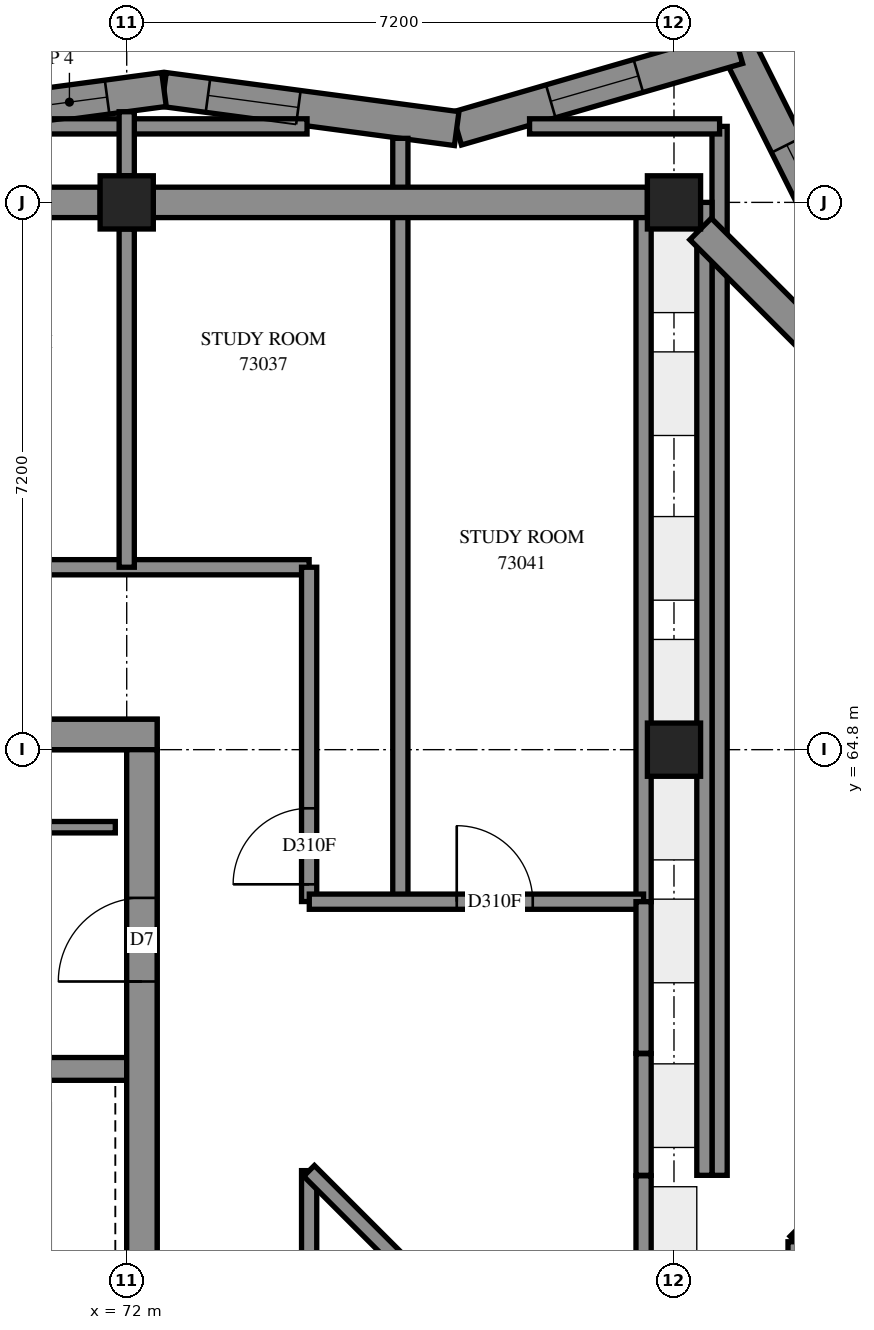
"""IFC4 building model, lengths in metres.
Left out: names, types, materials, properties, quantities, classifications, styles, units other than length and angle.
Written with IfcOpenShell. Run it as: python <this file> out.ifc"""

import sys

from ifc_helpers import new_model, si_unit, direction, frame, frame_2d, origin, origin_2d, place, context, subcontext, project, spatial, polyline, rectangle, outline, extrude, element, fill, save


model = new_model("IFC4")
c1 = context("Model", 3, precision=1e-05, world=origin(), true_north=direction((0.0, 1.0)))
c2 = subcontext(c1, "Body", "Model", "MODEL_VIEW")
j1 = project(units=[si_unit("LENGTHUNIT", "METRE"), si_unit("PLANEANGLEUNIT", "RADIAN")], contexts=[c1])
p1 = place(None, origin())
s1 = spatial("IfcSite", under=j1, at=p1, CompositionType="ELEMENT")
p2 = place(p1, origin())
s2 = spatial("IfcBuilding", under=s1, at=p2, CompositionType="ELEMENT")
p3 = place(p2, frame((0.0, 0.0, 267.6)))
s3 = spatial("IfcBuildingStorey", under=s2, at=p3, CompositionType="ELEMENT", Elevation=267.6)
for number, where, z_axis, x_axis in (
    (1, (72.0, 72.0, 0.0), (0.0, 0.0, 1.0), (1.0, 0.0, 0.0)),
    (2, (79.2, 64.8, 0.0), (0.0, 0.0, 1.0), (1.0, 0.0, 0.0)),
    (3, (79.2, 72.0, 0.0), (0.0, 0.0, 1.0), (1.0, 0.0, 0.0)),
):
    element("IfcColumn", number, at=place(p3, frame(where, z_axis=z_axis, x_axis=x_axis)), inside=s3, PredefinedType="COLUMN", context=c2, shape_type="SweptSolid", body=[
        extrude(rectangle(XDim=0.7, YDim=0.7, at=origin_2d()), origin(), (0.0, 0.0, 1.0), 3.1),
    ])
p4 = place(p3, frame((57.2, 65.0, -0.3), z_axis=(0.0, 0.0, 1.0), x_axis=(1.0, 0.0, 0.0)))
e4 = element("IfcWall", 4, at=p4, inside=s3, PredefinedType="SHEAR", context=c2, shape_type="SweptSolid", body=[
    extrude(rectangle(XDim=15.2, YDim=0.4, at=frame_2d((7.6, 0.0))), origin(), (0.0, 0.0, 1.0), 2.7),
])
p5 = place(p4, frame((10.4, 0.0, 0.3)))
e5 = element("IfcOpeningElement", 5, at=p5, cuts=e4, PredefinedType="OPENING", context=c2, shape_type="SweptSolid", body=[
    extrude(rectangle(XDim=0.8, YDim=2.1, at=frame_2d((0.4, 1.05))), frame((0.0, 0.21, 0.0), z_axis=(0.0, -1.0, 0.0), x_axis=(1.0, 0.0, 0.0)), (0.0, 0.0, 1.0), 0.42),
])
p6 = place(p3, frame((72.2, 50.4, -0.3), z_axis=(0.0, 0.0, 1.0), x_axis=(0.0, 1.0, 0.0)))
e6 = element("IfcWall", 6, at=p6, inside=s3, PredefinedType="SHEAR", context=c2, shape_type="SweptSolid", body=[
    extrude(rectangle(XDim=14.4, YDim=0.4, at=frame_2d((7.2, 0.0))), origin(), (0.0, 0.0, 1.0), 2.7),
])
p7 = place(p6, frame((4.55, 0.0, 0.3)))
e7 = element("IfcOpeningElement", 7, at=p7, cuts=e6, PredefinedType="OPENING", context=c2, shape_type="SweptSolid", body=[
    extrude(rectangle(XDim=1.1, YDim=2.1, at=frame_2d((0.55, 1.05))), frame((0.0, 0.21, 0.0), z_axis=(0.0, -1.0, 0.0), x_axis=(1.0, 0.0, 0.0)), (0.0, 0.0, 1.0), 0.42),
])
p8 = place(p6, frame((11.35, 0.0, 0.3)))
e8 = element("IfcOpeningElement", 8, at=p8, cuts=e6, PredefinedType="OPENING", context=c2, shape_type="SweptSolid", body=[
    extrude(rectangle(XDim=1.1, YDim=2.1, at=frame_2d((0.55, 1.05))), frame((0.0, 0.21, 0.0), z_axis=(0.0, -1.0, 0.0), x_axis=(1.0, 0.0, 0.0)), (0.0, 0.0, 1.0), 0.42),
])
p9 = place(p3, frame((64.8, 60.6, 0.0), z_axis=(0.0, 0.0, 1.0), x_axis=(1.0, 0.0, 0.0)))
e9 = element("IfcWall", 9, at=p9, inside=s3, PredefinedType="SOLIDWALL", context=c2, shape_type="SweptSolid", body=[
    extrude(rectangle(XDim=7.2, YDim=0.3, at=frame_2d((3.6, 0.0))), origin(), (0.0, 0.0, 1.0), 3.1),
])
p10 = place(p3, frame((76.513, 49.231, -0.3), z_axis=(0.0, 0.0, 1.0), x_axis=(0.7071067812, 0.7071067812, 0.0)))
e10 = element("IfcWall", 10, at=p10, inside=s3, PredefinedType="SHEAR", context=c2, shape_type="SweptSolid", body=[
    extrude(rectangle(XDim=14.4, YDim=0.4, at=frame_2d((7.2, 0.0))), origin(), (0.0, 0.0, 1.0), 2.7),
])
p11 = place(p10, frame((5.65, 0.0, 0.3)))
e11 = element("IfcOpeningElement", 11, at=p11, cuts=e10, PredefinedType="OPENING", context=c2, shape_type="SweptSolid", body=[
    extrude(rectangle(XDim=1.1, YDim=2.1, at=frame_2d((0.55, 1.05))), frame((0.0, 0.21, 0.0), z_axis=(0.0, -1.0, 0.0), x_axis=(1.0, 0.0, 0.0)), (0.0, 0.0, 1.0), 0.42),
])
p12 = place(p10, frame((11.35, 0.0, 0.3)))
e12 = element("IfcOpeningElement", 12, at=p12, cuts=e10, PredefinedType="OPENING", context=c2, shape_type="SweptSolid", body=[
    extrude(rectangle(XDim=1.1, YDim=2.1, at=frame_2d((0.55, 1.05))), frame((0.0, 0.21, 0.0), z_axis=(0.0, -1.0, 0.0), x_axis=(1.0, 0.0, 0.0)), (0.0, 0.0, 1.0), 0.42),
])
p13 = place(p10, frame((0.25, 0.0, 0.0)))
e13 = element("IfcOpeningElement", 13, at=p13, cuts=e10, PredefinedType="OPENING", context=c2, shape_type="SweptSolid", body=[
    extrude(rectangle(XDim=0.9, YDim=2.1, at=frame_2d((0.45, 1.05))), frame((0.0, 0.21, 0.0), z_axis=(0.0, -1.0, 0.0), x_axis=(1.0, 0.0, 0.0)), (0.0, 0.0, 1.0), 0.42),
])
p14 = place(p3, frame((81.553, 71.018, 0.0), z_axis=(0.0, 0.0, 1.0), x_axis=(-0.4471899486, 0.8944390141, 0.0)))
e14 = element("IfcWall", 14, at=p14, inside=s3, PredefinedType="SOLIDWALL", context=c2, shape_type="SweptSolid", body=[
    extrude(outline(polyline([(0.054, -0.225), (3.571, -0.225), (3.196, 0.225), (-0.054, 0.225), (0.054, -0.225)])), origin(), (0.0, 0.0, 1.0), 3.1),
])
p15 = place(p14, frame((0.743, 0.0, 0.45)))
e15 = element("IfcOpeningElement", 15, at=p15, cuts=e14, PredefinedType="OPENING", context=c2, shape_type="SweptSolid", body=[
    extrude(rectangle(XDim=1.2, YDim=2.55, at=frame_2d((0.6, 1.275))), frame((0.0, 0.235, 0.0), z_axis=(0.0, -1.0, 0.0), x_axis=(1.0, 0.0, 0.0)), (0.0, 0.0, 1.0), 0.47),
])
p16 = place(p3, frame((80.04, 74.044, 0.0), z_axis=(0.0, 0.0, 1.0), x_axis=(-0.9604089945, -0.278593904, 0.0)))
e16 = element("IfcWall", 16, at=p16, inside=s3, PredefinedType="SOLIDWALL", context=c2, shape_type="SweptSolid", body=[
    extrude(outline(polyline([(-0.188, -0.225), (3.804, -0.225), (3.899, 0.225), (0.188, 0.225), (-0.188, -0.225)])), origin(), (0.0, 0.0, 1.0), 3.1),
])
p17 = place(p16, frame((1.363, 0.0, 0.45)))
e17 = element("IfcOpeningElement", 17, at=p17, cuts=e16, PredefinedType="OPENING", context=c2, shape_type="SweptSolid", body=[
    extrude(rectangle(XDim=1.2, YDim=2.55, at=frame_2d((0.6, 1.275))), frame((0.0, 0.235, 0.0), z_axis=(0.0, -1.0, 0.0), x_axis=(1.0, 0.0, 0.0)), (0.0, 0.0, 1.0), 0.47),
])
p18 = place(p3, frame((76.341, 72.971, 0.0), z_axis=(0.0, 0.0, 1.0), x_axis=(-0.991198426, 0.1323845925, 0.0)))
e18 = element("IfcWall", 18, at=p18, inside=s3, PredefinedType="SOLIDWALL", context=c2, shape_type="SweptSolid", body=[
    extrude(outline(polyline([(0.047, -0.225), (3.915, -0.225), (3.855, 0.225), (-0.047, 0.225), (0.047, -0.225)])), origin(), (0.0, 0.0, 1.0), 3.1),
])
p19 = place(p18, frame((2.101, 0.0, 0.45)))
e19 = element("IfcOpeningElement", 19, at=p19, cuts=e18, PredefinedType="OPENING", context=c2, shape_type="SweptSolid", body=[
    extrude(rectangle(XDim=1.2, YDim=2.55, at=frame_2d((0.6, 1.275))), frame((0.0, 0.235, 0.0), z_axis=(0.0, -1.0, 0.0), x_axis=(1.0, 0.0, 0.0)), (0.0, 0.0, 1.0), 0.47),
])
p20 = place(p3, frame((72.491, 73.485, 0.0), z_axis=(0.0, 0.0, 1.0), x_axis=(-0.9911985198, -0.13238389, 0.0)))
e20 = element("IfcWall", 20, at=p20, inside=s3, PredefinedType="SOLIDWALL", context=c2, shape_type="SweptSolid", body=[
    extrude(outline(polyline([(-0.03, -0.225), (3.837, -0.225), (3.898, 0.225), (0.03, 0.225), (-0.03, -0.225)])), origin(), (0.0, 0.0, 1.0), 3.1),
])
p21 = place(p20, frame((0.755, 0.0, 0.45)))
e21 = element("IfcOpeningElement", 21, at=p21, cuts=e20, PredefinedType="OPENING", context=c2, shape_type="SweptSolid", body=[
    extrude(rectangle(XDim=1.0, YDim=2.5, at=frame_2d((0.5, 1.25))), frame((0.0, 0.235, 0.0), z_axis=(0.0, -1.0, 0.0), x_axis=(1.0, 0.0, 0.0)), (0.0, 0.0, 1.0), 0.47),
])
p22 = place(p20, frame((2.105, 0.0, 0.45)))
e22 = element("IfcOpeningElement", 22, at=p22, cuts=e20, PredefinedType="OPENING", context=c2, shape_type="SweptSolid", body=[
    extrude(rectangle(XDim=1.3, YDim=2.5, at=frame_2d((0.65, 1.25))), frame((0.0, 0.235, 0.0), z_axis=(0.0, -1.0, 0.0), x_axis=(1.0, 0.0, 0.0)), (0.0, 0.0, 1.0), 0.47),
])
p23 = place(p3, frame((64.95, 63.78, 0.0), z_axis=(0.0, 0.0, 1.0), x_axis=(1.0, 0.0, 0.0)))
e23 = element("IfcWall", 23, at=p23, inside=s3, PredefinedType="PARTITIONING", context=c2, shape_type="SweptSolid", body=[
    extrude(rectangle(XDim=6.9, YDim=0.15, at=frame_2d((3.45, 0.0))), origin(), (0.0, 0.0, 1.0), 3.1),
])
p24 = place(p3, frame((55.2, 67.2, 0.0), z_axis=(0.0, 0.0, 1.0), x_axis=(1.0, 0.0, 0.0)))
e24 = element("IfcWall", 24, at=p24, inside=s3, PredefinedType="PARTITIONING", context=c2, shape_type="SweptSolid", body=[
    extrude(rectangle(XDim=19.2, YDim=0.2, at=frame_2d((9.6, 0.0))), origin(), (0.0, 0.0, 1.0), 3.1),
])
p25 = place(p24, frame((4.32, 0.0, 0.0)))
e25 = element("IfcOpeningElement", 25, at=p25, cuts=e24, PredefinedType="OPENING", context=c2, shape_type="SweptSolid", body=[
    extrude(rectangle(XDim=1.0, YDim=2.1, at=frame_2d((0.5, 1.05))), frame((0.0, 0.11, 0.0), z_axis=(0.0, -1.0, 0.0), x_axis=(1.0, 0.0, 0.0)), (0.0, 0.0, 1.0), 0.22),
])
p26 = place(p24, frame((8.338, 0.0, 0.0)))
e26 = element("IfcOpeningElement", 26, at=p26, cuts=e24, PredefinedType="OPENING", context=c2, shape_type="SweptSolid", body=[
    extrude(rectangle(XDim=1.0, YDim=2.1, at=frame_2d((0.5, 1.05))), frame((0.0, 0.11, 0.0), z_axis=(0.0, -1.0, 0.0), x_axis=(1.0, 0.0, 0.0)), (0.0, 0.0, 1.0), 0.22),
])
p27 = place(p24, frame((13.768, 0.0, 0.0)))
e27 = element("IfcOpeningElement", 27, at=p27, cuts=e24, PredefinedType="OPENING", context=c2, shape_type="SweptSolid", body=[
    extrude(rectangle(XDim=1.0, YDim=2.1, at=frame_2d((0.5, 1.05))), frame((0.0, 0.11, 0.0), z_axis=(0.0, -1.0, 0.0), x_axis=(1.0, 0.0, 0.0)), (0.0, 0.0, 1.0), 0.22),
])
p28 = place(p3, frame((79.8, 59.2, 0.0), z_axis=(0.0, 0.0, 1.0), x_axis=(0.0, 1.0, 0.0)))
e28 = element("IfcWall", 28, at=p28, inside=s3, PredefinedType="PARTITIONING", context=c2, shape_type="SweptSolid", body=[
    extrude(rectangle(XDim=13.8, YDim=0.2, at=frame_2d((6.9, 0.0))), origin(), (0.0, 0.0, 1.0), 3.1),
])
p29 = place(p3, frame((79.6, 59.2, 0.0), z_axis=(0.0, 0.0, 1.0), x_axis=(0.0, 1.0, 0.0)))
e29 = element("IfcWall", 29, at=p29, inside=s3, PredefinedType="PARTITIONING", context=c2, shape_type="SweptSolid", body=[
    extrude(rectangle(XDim=12.8, YDim=0.2, at=frame_2d((6.4, 0.0))), origin(), (0.0, 0.0, 1.0), 3.1),
])
p30 = place(p3, frame((75.6, 62.8, 0.0), z_axis=(0.0, 0.0, 1.0), x_axis=(0.0, 1.0, 0.0)))
e30 = element("IfcWall", 30, at=p30, inside=s3, PredefinedType="PARTITIONING", context=c2, shape_type="SweptSolid", body=[
    extrude(rectangle(XDim=10.043, YDim=0.2, at=frame_2d((5.021, 0.0))), origin(), (0.0, 0.0, 1.0), 3.1),
])
p31 = place(p3, frame((80.799, 58.327, 0.0), z_axis=(0.0, 0.0, 1.0), x_axis=(0.7071120163, 0.707101546, 0.0)))
e31 = element("IfcWall", 31, at=p31, inside=s3, PredefinedType="PARTITIONING", context=c2, shape_type="SweptSolid", body=[
    extrude(rectangle(XDim=9.551, YDim=0.2, at=frame_2d((4.775, 0.0))), origin(), (0.0, 0.0, 1.0), 3.1),
])
p32 = place(p3, frame((78.8, 62.8, 0.0), z_axis=(0.0, 0.0, 1.0), x_axis=(0.0, 1.0, 0.0)))
e32 = element("IfcWall", 32, at=p32, inside=s3, PredefinedType="PARTITIONING", context=c2, shape_type="SweptSolid", body=[
    extrude(rectangle(XDim=9.2, YDim=0.2, at=frame_2d((4.6, 0.0))), origin(), (0.0, 0.0, 1.0), 3.1),
])
p33 = place(p3, frame((80.802, 56.633, 0.0), z_axis=(0.0, 0.0, 1.0), x_axis=(0.7071067812, 0.7071067812, 0.0)))
e33 = element("IfcWall", 33, at=p33, inside=s3, PredefinedType="PARTITIONING", context=c2, shape_type="SweptSolid", body=[
    extrude(rectangle(XDim=8.533, YDim=0.2, at=frame_2d((4.267, 0.0))), origin(), (0.0, 0.0, 1.0), 3.1),
])
p34 = place(p33, frame((0.817, 0.0, 0.0)))
e34 = element("IfcOpeningElement", 34, at=p34, cuts=e33, PredefinedType="OPENING", context=c2, shape_type="SweptSolid", body=[
    extrude(rectangle(XDim=1.0, YDim=2.1, at=frame_2d((0.5, 1.05))), frame((0.0, 0.11, 0.0), z_axis=(0.0, -1.0, 0.0), x_axis=(1.0, 0.0, 0.0)), (0.0, 0.0, 1.0), 0.22),
])
p35 = place(p3, frame((78.8, 51.914, 0.0), z_axis=(0.0, 0.0, 1.0), x_axis=(0.0, 1.0, 0.0)))
e35 = element("IfcWall", 35, at=p35, inside=s3, PredefinedType="PARTITIONING", context=c2, shape_type="SweptSolid", body=[
    extrude(rectangle(XDim=7.28, YDim=0.2, at=frame_2d((3.64, 0.0))), origin(), (0.0, 0.0, 1.0), 3.1),
])
p36 = place(p3, frame((72.0, 67.2, 0.0), z_axis=(0.0, 0.0, 1.0), x_axis=(0.0, 1.0, 0.0)))
e36 = element("IfcWall", 36, at=p36, inside=s3, PredefinedType="PARTITIONING", context=c2, shape_type="SweptSolid", body=[
    extrude(rectangle(XDim=4.45, YDim=0.2, at=frame_2d((2.225, 0.0))), origin(), (0.0, 0.0, 1.0), 3.1),
])
p37 = place(p3, frame((74.4, 62.802, 0.0), z_axis=(0.0, 0.0, 1.0), x_axis=(0.0, 1.0, 0.0)))
e37 = element("IfcWall", 37, at=p37, inside=s3, PredefinedType="PARTITIONING", context=c2, shape_type="SweptSolid", body=[
    extrude(rectangle(XDim=4.398, YDim=0.2, at=frame_2d((2.199, 0.0))), origin(), (0.0, 0.0, 1.0), 3.1),
])
p38 = place(p37, frame((0.227, 0.0, 0.0)))
e38 = element("IfcOpeningElement", 38, at=p38, cuts=e37, PredefinedType="OPENING", context=c2, shape_type="SweptSolid", body=[
    extrude(rectangle(XDim=1.0, YDim=2.1, at=frame_2d((0.5, 1.05))), frame((0.0, 0.11, 0.0), z_axis=(0.0, -1.0, 0.0), x_axis=(1.0, 0.0, 0.0)), (0.0, 0.0, 1.0), 0.22),
])
p39 = place(p3, frame((74.402, 62.8, 0.0), z_axis=(0.0, 0.0, 1.0), x_axis=(1.0, 0.0, 0.0)))
e39 = element("IfcWall", 39, at=p39, inside=s3, PredefinedType="PARTITIONING", context=c2, shape_type="SweptSolid", body=[
    extrude(rectangle(XDim=4.398, YDim=0.2, at=frame_2d((2.199, 0.0))), origin(), (0.0, 0.0, 1.0), 3.1),
])
p40 = place(p39, frame((1.94, 0.0, 0.0)))
e40 = element("IfcOpeningElement", 40, at=p40, cuts=e39, PredefinedType="OPENING", context=c2, shape_type="SweptSolid", body=[
    extrude(rectangle(XDim=1.0, YDim=2.1, at=frame_2d((0.5, 1.05))), frame((0.0, 0.11, 0.0), z_axis=(0.0, -1.0, 0.0), x_axis=(1.0, 0.0, 0.0)), (0.0, 0.0, 1.0), 0.22),
])
p41 = place(p3, frame((70.609, 73.0, 0.0), z_axis=(0.0, 0.0, 1.0), x_axis=(1.0, 0.0, 0.0)))
e41 = element("IfcWall", 41, at=p41, inside=s3, PredefinedType="PARTITIONING", context=c2, shape_type="SweptSolid", body=[
    extrude(rectangle(XDim=3.764, YDim=0.2, at=frame_2d((1.882, 0.0))), origin(), (0.0, 0.0, 1.0), 3.1),
])
p42 = place(p3, frame((74.4, 55.602, 0.0), z_axis=(0.0, 0.0, 1.0), x_axis=(0.0, 1.0, 0.0)))
e42 = element("IfcWall", 42, at=p42, inside=s3, PredefinedType="PARTITIONING", context=c2, shape_type="SweptSolid", body=[
    extrude(rectangle(XDim=3.66, YDim=0.2, at=frame_2d((1.83, 0.0))), origin(), (0.0, 0.0, 1.0), 3.1),
])
p43 = place(p3, frame((77.3, 73.0, 0.0), z_axis=(0.0, 0.0, 1.0), x_axis=(1.0, 0.0, 0.0)))
e43 = element("IfcWall", 43, at=p43, inside=s3, PredefinedType="PARTITIONING", context=c2, shape_type="SweptSolid", body=[
    extrude(rectangle(XDim=2.5, YDim=0.2, at=frame_2d((1.25, 0.0))), origin(), (0.0, 0.0, 1.0), 3.1),
])
p44 = place(p3, frame((78.8, 60.806, 0.0), z_axis=(0.0, 0.0, 1.0), x_axis=(0.0, 1.0, 0.0)))
e44 = element("IfcWall", 44, at=p44, inside=s3, PredefinedType="PARTITIONING", context=c2, shape_type="SweptSolid", body=[
    extrude(rectangle(XDim=1.994, YDim=0.2, at=frame_2d((0.997, 0.0))), origin(), (0.0, 0.0, 1.0), 3.1),
])
p45 = place(p3, frame((74.399, 59.259, 0.0), z_axis=(0.0, 0.0, 1.0), x_axis=(0.7071067812, -0.7071067812, 0.0)))
e45 = element("IfcWall", 45, at=p45, inside=s3, PredefinedType="PARTITIONING", context=c2, shape_type="SweptSolid", body=[
    extrude(rectangle(XDim=1.694, YDim=0.2, at=frame_2d((0.847, 0.0))), origin(), (0.0, 0.0, 1.0), 3.1),
])
p46 = place(p3, frame((78.8, 59.2, 0.0), z_axis=(0.0, 0.0, 1.0), x_axis=(0.0, 1.0, 0.0)))
e46 = element("IfcWall", 46, at=p46, inside=s3, PredefinedType="PARTITIONING", context=c2, shape_type="SweptSolid", body=[
    extrude(rectangle(XDim=1.6, YDim=0.2, at=frame_2d((0.8, 0.0))), origin(), (0.0, 0.0, 1.0), 3.1),
])
p47 = place(p3, frame((80.8, 56.912, 0.0), z_axis=(0.0, 0.0, 1.0), x_axis=(0.0, 1.0, 0.0)))
e47 = element("IfcWall", 47, at=p47, inside=s3, PredefinedType="PARTITIONING", context=c2, shape_type="SweptSolid", body=[
    extrude(rectangle(XDim=1.414, YDim=0.2, at=frame_2d((0.707, 0.0))), origin(), (0.0, 0.0, 1.0), 3.1),
])
p48 = place(p3, frame((72.0, 72.35, 0.0), z_axis=(0.0, 0.0, 1.0), x_axis=(0.0, 1.0, 0.0)))
e48 = element("IfcWall", 48, at=p48, inside=s3, PredefinedType="PARTITIONING", context=c2, shape_type="SweptSolid", body=[
    extrude(rectangle(XDim=0.843, YDim=0.2, at=frame_2d((0.421, 0.0))), origin(), (0.0, 0.0, 1.0), 3.1),
])
p49 = place(p15, origin())
e49 = element("IfcWindow", 49, at=p49, inside=s3, PartitioningType="SINGLE_PANEL", PredefinedType="WINDOW", context=c2, shape_type="SweptSolid", body=[
    extrude(rectangle(XDim=1.2, YDim=2.55, at=frame_2d((0.6, 1.275))), frame((0.0, 0.205, 0.0), z_axis=(0.0, -1.0, 0.0), x_axis=(1.0, 0.0, 0.0)), (0.0, 0.0, 1.0), 0.06),
])
fill(e15, e49)
p50 = place(p17, origin())
e50 = element("IfcWindow", 50, at=p50, inside=s3, PartitioningType="SINGLE_PANEL", PredefinedType="WINDOW", context=c2, shape_type="SweptSolid", body=[
    extrude(rectangle(XDim=1.2, YDim=2.55, at=frame_2d((0.6, 1.275))), frame((0.0, 0.205, 0.0), z_axis=(0.0, -1.0, 0.0), x_axis=(1.0, 0.0, 0.0)), (0.0, 0.0, 1.0), 0.06),
])
fill(e17, e50)
p51 = place(p19, origin())
e51 = element("IfcWindow", 51, at=p51, inside=s3, PartitioningType="SINGLE_PANEL", PredefinedType="WINDOW", context=c2, shape_type="SweptSolid", body=[
    extrude(rectangle(XDim=1.2, YDim=2.55, at=frame_2d((0.6, 1.275))), frame((0.0, 0.115, 0.0), z_axis=(0.0, -1.0, 0.0), x_axis=(1.0, 0.0, 0.0)), (0.0, 0.0, 1.0), 0.06),
])
fill(e19, e51)
p52 = place(p8, origin())
e52 = element("IfcDoor", 52, at=p52, inside=s3, OperationType="SINGLE_SWING_RIGHT", PredefinedType="DOOR", context=c2, shape_type="SweptSolid", body=[
    extrude(rectangle(XDim=1.1, YDim=2.1, at=frame_2d((0.55, 1.05))), frame((0.0, 0.025, 0.0), z_axis=(0.0, -1.0, 0.0), x_axis=(1.0, 0.0, 0.0)), (0.0, 0.0, 1.0), 0.05),
])
fill(e8, e52)
p53 = place(p38, origin())
e53 = element("IfcDoor", 53, at=p53, inside=s3, OperationType="SINGLE_SWING_RIGHT", PredefinedType="DOOR", context=c2, shape_type="SweptSolid", body=[
    extrude(rectangle(XDim=1.0, YDim=2.1, at=frame_2d((0.5, 1.05))), frame((0.0, 0.025, 0.0), z_axis=(0.0, -1.0, 0.0), x_axis=(1.0, 0.0, 0.0)), (0.0, 0.0, 1.0), 0.05),
])
fill(e38, e53)
p54 = place(p40, origin())
e54 = element("IfcDoor", 54, at=p54, inside=s3, OperationType="SINGLE_SWING_LEFT", PredefinedType="DOOR", context=c2, shape_type="SweptSolid", body=[
    extrude(rectangle(XDim=1.0, YDim=2.1, at=frame_2d((0.5, 1.05))), frame((0.0, 0.025, 0.0), z_axis=(0.0, -1.0, 0.0), x_axis=(1.0, 0.0, 0.0)), (0.0, 0.0, 1.0), 0.05),
])
fill(e40, e54)
p55 = place(p21, origin())
e55 = element("IfcWindow", 55, at=p55, inside=s3, PartitioningType="SINGLE_PANEL", PredefinedType="WINDOW", context=c2, shape_type="SweptSolid", body=[
    extrude(rectangle(XDim=1.0, YDim=2.5, at=frame_2d((0.5, 1.25))), frame((0.0, 0.115, 0.0), z_axis=(0.0, -1.0, 0.0), x_axis=(1.0, 0.0, 0.0)), (0.0, 0.0, 1.0), 0.06),
])
fill(e21, e55)
save(model, sys.argv[1])
